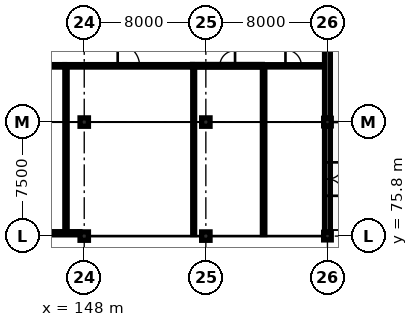
"""IFC4 building model, lengths in metres.
Left out: names, types, materials, properties, quantities, classifications, styles, units other than length and angle.
Written with IfcOpenShell. Run it as: python <this file> out.ifc"""

import sys

from ifc_helpers import new_model, si_unit, direction, frame, frame_2d, origin, origin_2d, place, context, subcontext, project, spatial, rectangle, extrude, element, fill, save


model = new_model("IFC4")
c1 = context("Model", 3, precision=1e-05, world=origin(), true_north=direction((0.0, 1.0)))
c2 = subcontext(c1, "Body", "Model", "MODEL_VIEW")
j1 = project(units=[si_unit("LENGTHUNIT", "METRE"), si_unit("PLANEANGLEUNIT", "RADIAN")], contexts=[c1])
p1 = place(None, origin())
s1 = spatial("IfcSite", under=j1, at=p1, CompositionType="ELEMENT")
p2 = place(p1, origin())
s2 = spatial("IfcBuilding", under=s1, at=p2, CompositionType="ELEMENT")
p3 = place(p2, origin())
s3 = spatial("IfcBuildingStorey", under=s2, at=p3, CompositionType="ELEMENT", Elevation=0.0)
for number, where, z_axis, x_axis in (
    (1, (148.0, 75.8, 0.0), (0.0, 0.0, 1.0), (1.0, 0.0, 0.0)),
    (2, (148.0, 83.3, 0.0), (0.0, 0.0, 1.0), (1.0, 0.0, 0.0)),
    (3, (156.0, 75.8, 0.0), (0.0, 0.0, 1.0), (1.0, 0.0, 0.0)),
    (4, (156.0, 83.3, 0.0), (0.0, 0.0, 1.0), (1.0, 0.0, 0.0)),
):
    element("IfcColumn", number, at=place(p3, frame(where, z_axis=z_axis, x_axis=x_axis)), inside=s3, PredefinedType="COLUMN", context=c2, shape_type="SweptSolid", body=[
        extrude(rectangle(XDim=0.55, YDim=0.55, at=origin_2d()), origin(), (0.0, 0.0, 1.0), 4.7),
    ])
for number, where, z_axis, x_axis in (
    (5, (164.0, 75.8, 0.0), (0.0, 0.0, 1.0), (1.0, 0.0, 0.0)),
    (6, (164.0, 83.3, 0.0), (0.0, 0.0, 1.0), (1.0, 0.0, 0.0)),
):
    element("IfcColumn", number, at=place(p3, frame(where, z_axis=z_axis, x_axis=x_axis)), inside=s3, PredefinedType="COLUMN", context=c2, shape_type="SweptSolid", body=[
        extrude(rectangle(XDim=0.5, YDim=0.5, at=origin_2d()), origin(), (0.0, 0.0, 1.0), 6.226),
    ])
p4 = place(p3, frame((164.0, 90.55, 0.0), z_axis=(0.0, 0.0, 1.0), x_axis=(0.0, -1.0, 0.0)))
e7 = element("IfcWall", 7, at=p4, inside=s3, PredefinedType="SOLIDWALL", context=c2, shape_type="SweptSolid", body=[
    extrude(rectangle(XDim=7.0, YDim=0.38, at=frame_2d((3.5, 0.0))), origin(), (0.0, 0.0, 1.0), 4.67),
])
p5 = place(p3, frame((164.0, 83.05, 0.0), z_axis=(0.0, 0.0, 1.0), x_axis=(0.0, -1.0, 0.0)))
e8 = element("IfcWall", 8, at=p5, inside=s3, PredefinedType="SOLIDWALL", context=c2, shape_type="SweptSolid", body=[
    extrude(rectangle(XDim=7.0, YDim=0.38, at=frame_2d((3.5, 0.0))), origin(), (0.0, 0.0, 1.0), 4.67),
])
p6 = place(p5, frame((2.4, 0.0, 0.0)))
e9 = element("IfcOpeningElement", 9, at=p6, cuts=e8, PredefinedType="OPENING", context=c2, shape_type="SweptSolid", body=[
    extrude(rectangle(XDim=2.2, YDim=2.45, at=frame_2d((1.1, 1.225))), frame((0.0, 0.202, 0.0), z_axis=(0.0, -1.0, 0.0), x_axis=(1.0, 0.0, 0.0)), (0.0, 0.0, 1.0), 0.404),
])
p7 = place(p3, frame((138.327, 87.0, 0.0), z_axis=(0.0, 0.0, 1.0), x_axis=(1.0, 0.0, 0.0)))
e10 = element("IfcWall", 10, at=p7, inside=s3, PredefinedType="PARTITIONING", context=c2, shape_type="SweptSolid", body=[
    extrude(rectangle(XDim=8.388, YDim=0.16, at=frame_2d((4.194, 0.0))), origin(), (0.0, 0.0, 1.0), 3.985),
])
p8 = place(p7, frame((3.504, 0.0, 0.0)))
e11 = element("IfcOpeningElement", 11, at=p8, cuts=e10, PredefinedType="OPENING", context=c2, shape_type="SweptSolid", body=[
    extrude(rectangle(XDim=1.38, YDim=2.3, at=frame_2d((0.69, 1.15))), frame((0.0, 0.092, 0.0), z_axis=(0.0, -1.0, 0.0), x_axis=(1.0, 0.0, 0.0)), (0.0, 0.0, 1.0), 0.184),
])
p9 = place(p3, frame((146.727, 87.0, 0.0), z_axis=(0.0, 0.0, 1.0), x_axis=(1.0, 0.0, 0.0)))
e12 = element("IfcWall", 12, at=p9, inside=s3, PredefinedType="PARTITIONING", context=c2, shape_type="SweptSolid", body=[
    extrude(rectangle(XDim=8.388, YDim=0.16, at=frame_2d((4.194, 0.0))), origin(), (0.0, 0.0, 1.0), 3.985),
])
p10 = place(p9, frame((3.474, 0.0, 0.0)))
e13 = element("IfcOpeningElement", 13, at=p10, cuts=e12, PredefinedType="OPENING", context=c2, shape_type="SweptSolid", body=[
    extrude(rectangle(XDim=1.44, YDim=2.32, at=frame_2d((0.72, 1.16))), frame((0.0, 0.092, 0.0), z_axis=(0.0, -1.0, 0.0), x_axis=(1.0, 0.0, 0.0)), (0.0, 0.0, 1.0), 0.184),
])
p11 = place(p3, frame((155.127, 87.0, 0.0), z_axis=(0.0, 0.0, 1.0), x_axis=(1.0, 0.0, 0.0)))
e14 = element("IfcWall", 14, at=p11, inside=s3, PredefinedType="PARTITIONING", context=c2, shape_type="SweptSolid", body=[
    extrude(rectangle(XDim=4.588, YDim=0.18, at=frame_2d((2.294, 0.0))), origin(), (0.0, 0.0, 1.0), 4.035),
])
p12 = place(p11, frame((1.794, 0.0, 0.0)))
e15 = element("IfcOpeningElement", 15, at=p12, cuts=e14, PredefinedType="OPENING", context=c2, shape_type="SweptSolid", body=[
    extrude(rectangle(XDim=1.0, YDim=2.15, at=frame_2d((0.5, 1.075))), frame((0.0, 0.102, 0.0), z_axis=(0.0, -1.0, 0.0), x_axis=(1.0, 0.0, 0.0)), (0.0, 0.0, 1.0), 0.204),
])
p13 = place(p3, frame((159.727, 87.0, 0.0), z_axis=(0.0, 0.0, 1.0), x_axis=(1.0, 0.0, 0.0)))
e16 = element("IfcWall", 16, at=p13, inside=s3, PredefinedType="PARTITIONING", context=c2, shape_type="SweptSolid", body=[
    extrude(rectangle(XDim=4.071, YDim=0.15, at=frame_2d((2.036, 0.0))), origin(), (0.0, 0.0, 1.0), 4.67),
])
p14 = place(p13, frame((1.51, 0.0, 0.0)))
e17 = element("IfcOpeningElement", 17, at=p14, cuts=e16, PredefinedType="OPENING", context=c2, shape_type="SweptSolid", body=[
    extrude(rectangle(XDim=1.05, YDim=2.15, at=frame_2d((0.525, 1.075))), frame((0.0, 0.087, 0.0), z_axis=(0.0, -1.0, 0.0), x_axis=(1.0, 0.0, 0.0)), (0.0, 0.0, 1.0), 0.174),
])
p15 = place(p3, frame((138.327, 76.0, 0.0), z_axis=(0.0, 0.0, 1.0), x_axis=(1.0, 0.0, 0.0)))
e18 = element("IfcWall", 18, at=p15, inside=s3, PredefinedType="PARTITIONING", context=c2, shape_type="SweptSolid", body=[
    extrude(rectangle(XDim=9.386, YDim=0.18, at=frame_2d((4.693, 0.0))), origin(), (0.0, 0.0, 1.0), 3.985),
])
p16 = place(p3, frame((146.8, 76.102, 0.0), z_axis=(0.0, 0.0, 1.0), x_axis=(0.0, 1.0, 0.0)))
e19 = element("IfcWall", 19, at=p16, inside=s3, PredefinedType="PARTITIONING", context=c2, shape_type="SweptSolid", body=[
    extrude(rectangle(XDim=10.806, YDim=0.15, at=frame_2d((5.403, 0.0))), origin(), (0.0, 0.0, 1.0), 3.885),
])
p17 = place(p3, frame((155.2, 75.902, 0.0), z_axis=(0.0, 0.0, 1.0), x_axis=(0.0, 1.0, 0.0)))
e20 = element("IfcWall", 20, at=p17, inside=s3, PredefinedType="PARTITIONING", context=c2, shape_type="SweptSolid", body=[
    extrude(rectangle(XDim=10.996, YDim=0.125, at=frame_2d((5.498, 0.0))), origin(), (0.0, 0.0, 1.0), 3.885),
])
p18 = place(p3, frame((159.8, 75.902, 0.0), z_axis=(0.0, 0.0, 1.0), x_axis=(0.0, 1.0, 0.0)))
e21 = element("IfcWall", 21, at=p18, inside=s3, PredefinedType="PARTITIONING", context=c2, shape_type="SweptSolid", body=[
    extrude(rectangle(XDim=11.011, YDim=0.16, at=frame_2d((5.505, 0.0))), origin(), (0.0, 0.0, 1.0), 4.616),
])
p19 = place(p6, origin())
e22 = element("IfcDoor", 22, at=p19, inside=s3, OperationType="DOUBLE_DOOR_SINGLE_SWING", PredefinedType="DOOR", context=c2, shape_type="SweptSolid", body=[
    extrude(rectangle(XDim=2.2, YDim=2.45, at=frame_2d((1.1, 1.225))), frame((0.0, 0.025, 0.0), z_axis=(0.0, -1.0, 0.0), x_axis=(1.0, 0.0, 0.0)), (0.0, 0.0, 1.0), 0.05),
])
fill(e9, e22)
p20 = place(p10, origin())
e23 = element("IfcDoor", 23, at=p20, inside=s3, OperationType="SINGLE_SWING_LEFT", PredefinedType="DOOR", context=c2, shape_type="SweptSolid", body=[
    extrude(rectangle(XDim=1.44, YDim=2.32, at=frame_2d((0.72, 1.16))), frame((0.0, 0.025, 0.0), z_axis=(0.0, -1.0, 0.0), x_axis=(1.0, 0.0, 0.0)), (0.0, 0.0, 1.0), 0.05),
])
fill(e13, e23)
p21 = place(p12, origin())
e24 = element("IfcDoor", 24, at=p21, inside=s3, OperationType="SINGLE_SWING_RIGHT", PredefinedType="DOOR", context=c2, shape_type="SweptSolid", body=[
    extrude(rectangle(XDim=1.0, YDim=2.15, at=frame_2d((0.5, 1.075))), frame((0.0, 0.025, 0.0), z_axis=(0.0, -1.0, 0.0), x_axis=(1.0, 0.0, 0.0)), (0.0, 0.0, 1.0), 0.05),
])
fill(e15, e24)
p22 = place(p14, origin())
e25 = element("IfcDoor", 25, at=p22, inside=s3, OperationType="SINGLE_SWING_LEFT", PredefinedType="DOOR", context=c2, shape_type="SweptSolid", body=[
    extrude(rectangle(XDim=1.05, YDim=2.15, at=frame_2d((0.525, 1.075))), frame((0.0, 0.025, 0.0), z_axis=(0.0, -1.0, 0.0), x_axis=(1.0, 0.0, 0.0)), (0.0, 0.0, 1.0), 0.05),
])
fill(e17, e25)
save(model, sys.argv[1])
